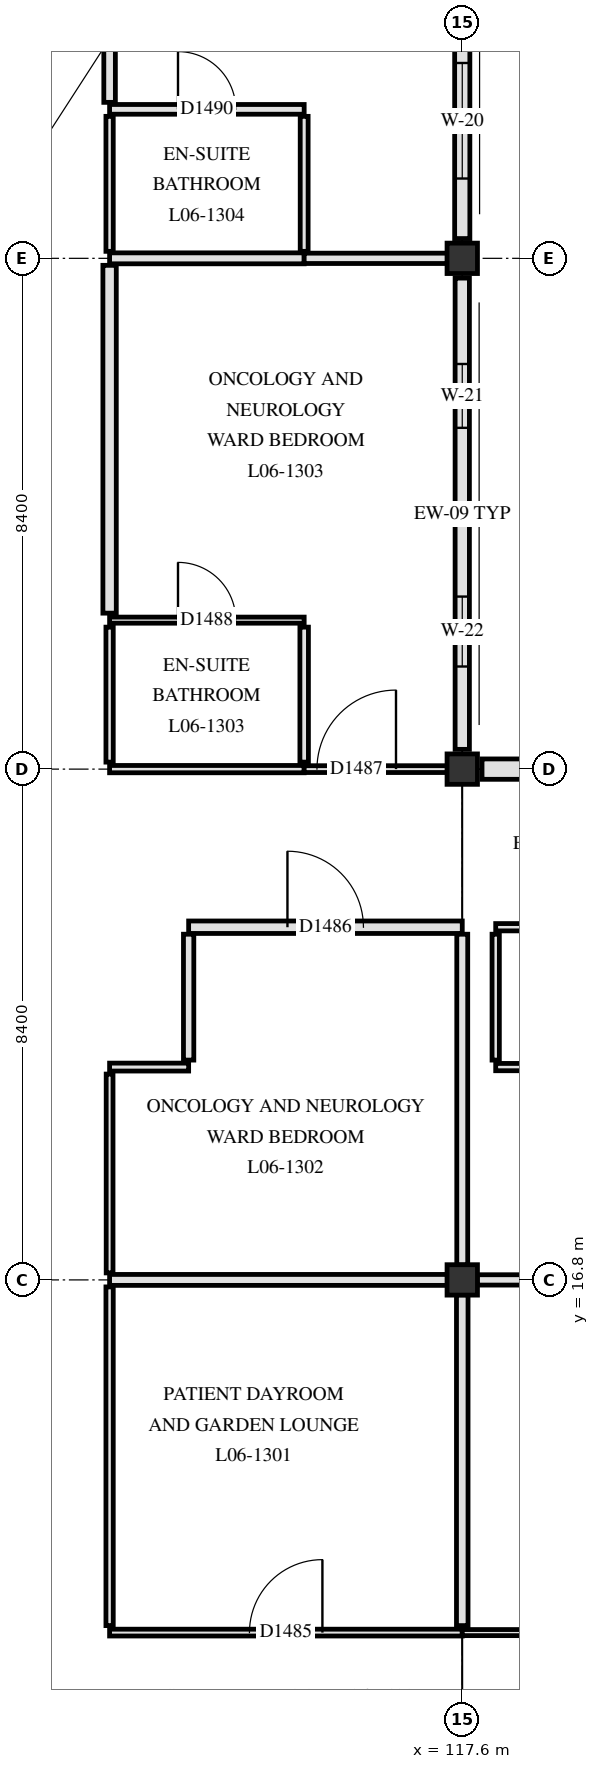
"""IFC4 building model, lengths in metres.
Left out: names, types, materials, properties, quantities, classifications, styles, units other than length and angle.
Written with IfcOpenShell. Run it as: python <this file> out.ifc"""

import sys

from ifc_helpers import new_model, si_unit, direction, frame, frame_2d, origin, origin_2d, place, context, subcontext, project, spatial, rectangle, extrude, element, fill, save


model = new_model("IFC4")
c1 = context("Model", 3, precision=1e-05, world=origin(), true_north=direction((0.0, 1.0)))
c2 = subcontext(c1, "Body", "Model", "MODEL_VIEW")
j1 = project(units=[si_unit("LENGTHUNIT", "METRE"), si_unit("PLANEANGLEUNIT", "RADIAN")], contexts=[c1])
p1 = place(None, origin())
s1 = spatial("IfcSite", under=j1, at=p1, CompositionType="ELEMENT")
p2 = place(p1, origin())
s2 = spatial("IfcBuilding", under=s1, at=p2, CompositionType="ELEMENT")
p3 = place(p2, frame((0.0, 0.0, 26.4)))
s3 = spatial("IfcBuildingStorey", under=s2, at=p3, CompositionType="ELEMENT", Elevation=26.4)
for number, where, z_axis, x_axis in (
    (1, (117.6, 16.8, 0.0), (0.0, 0.0, 1.0), (1.0, 0.0, 0.0)),
    (2, (117.6, 25.2, 0.0), (0.0, 0.0, 1.0), (1.0, 0.0, 0.0)),
    (3, (117.6, 33.6, 0.0), (0.0, 0.0, 1.0), (1.0, 0.0, 0.0)),
):
    element("IfcColumn", number, at=place(p3, frame(where, z_axis=z_axis, x_axis=x_axis)), inside=s3, PredefinedType="COLUMN", context=c2, shape_type="SweptSolid", body=[
        extrude(rectangle(XDim=0.5, YDim=0.5, at=origin_2d()), origin(), (0.0, 0.0, 1.0), 3.9),
    ])
p4 = place(p3, frame((117.6, 41.675, 0.0), z_axis=(0.0, 0.0, 1.0), x_axis=(0.0, -1.0, 0.0)))
e4 = element("IfcWall", 4, at=p4, inside=s3, PredefinedType="SOLIDWALL", context=c2, shape_type="SweptSolid", body=[
    extrude(rectangle(XDim=7.75, YDim=0.25, at=frame_2d((3.875, 0.0))), origin(), (0.0, 0.0, 1.0), 3.38),
])
p5 = place(p4, frame((1.038, 0.0, 0.85)))
e5 = element("IfcOpeningElement", 5, at=p5, cuts=e4, PredefinedType="OPENING", context=c2, shape_type="SweptSolid", body=[
    extrude(rectangle(XDim=1.8, YDim=1.42, at=frame_2d((0.9, 0.71))), frame((0.0, 0.135, 0.0), z_axis=(0.0, -1.0, 0.0), x_axis=(1.0, 0.0, 0.0)), (0.0, 0.0, 1.0), 0.27),
])
p6 = place(p4, frame((4.863, 0.0, 0.85)))
e6 = element("IfcOpeningElement", 6, at=p6, cuts=e4, PredefinedType="OPENING", context=c2, shape_type="SweptSolid", body=[
    extrude(rectangle(XDim=1.9, YDim=1.42, at=frame_2d((0.95, 0.71))), frame((0.0, 0.135, 0.0), z_axis=(0.0, -1.0, 0.0), x_axis=(1.0, 0.0, 0.0)), (0.0, 0.0, 1.0), 0.27),
])
p7 = place(p3, frame((117.6, 33.275, 0.0), z_axis=(0.0, 0.0, 1.0), x_axis=(0.0, -1.0, 0.0)))
e7 = element("IfcWall", 7, at=p7, inside=s3, PredefinedType="SOLIDWALL", context=c2, shape_type="SweptSolid", body=[
    extrude(rectangle(XDim=7.75, YDim=0.235, at=frame_2d((3.875, 0.0))), origin(), (0.0, 0.0, 1.0), 3.38),
])
p8 = place(p7, frame((1.413, 0.0, 0.85)))
e8 = element("IfcOpeningElement", 8, at=p8, cuts=e7, PredefinedType="OPENING", context=c2, shape_type="SweptSolid", body=[
    extrude(rectangle(XDim=1.05, YDim=1.54, at=frame_2d((0.525, 0.77))), frame((0.0, 0.127, 0.0), z_axis=(0.0, -1.0, 0.0), x_axis=(1.0, 0.0, 0.0)), (0.0, 0.0, 1.0), 0.255),
])
p9 = place(p7, frame((5.238, 0.0, 0.85)))
e9 = element("IfcOpeningElement", 9, at=p9, cuts=e7, PredefinedType="OPENING", context=c2, shape_type="SweptSolid", body=[
    extrude(rectangle(XDim=1.15, YDim=1.54, at=frame_2d((0.575, 0.77))), frame((0.0, 0.127, 0.0), z_axis=(0.0, -1.0, 0.0), x_axis=(1.0, 0.0, 0.0)), (0.0, 0.0, 1.0), 0.255),
])
p10 = place(p3, frame((117.925, 25.2, 0.0), z_axis=(0.0, 0.0, 1.0), x_axis=(1.0, 0.0, 0.0)))
e10 = element("IfcWall", 10, at=p10, inside=s3, PredefinedType="SOLIDWALL", context=c2, shape_type="SweptSolid", body=[
    extrude(rectangle(XDim=7.75, YDim=0.335, at=frame_2d((3.875, 0.0))), origin(), (0.0, 0.0, 1.0), 3.36),
])
p11 = place(p10, frame((1.312, 0.0, 0.85)))
e11 = element("IfcOpeningElement", 11, at=p11, cuts=e10, PredefinedType="OPENING", context=c2, shape_type="SweptSolid", body=[
    extrude(rectangle(XDim=1.25, YDim=1.54, at=frame_2d((0.625, 0.77))), frame((0.0, 0.177, 0.0), z_axis=(0.0, -1.0, 0.0), x_axis=(1.0, 0.0, 0.0)), (0.0, 0.0, 1.0), 0.355),
])
p12 = place(p10, frame((5.137, 0.0, 0.85)))
e12 = element("IfcOpeningElement", 12, at=p12, cuts=e10, PredefinedType="OPENING", context=c2, shape_type="SweptSolid", body=[
    extrude(rectangle(XDim=1.35, YDim=1.54, at=frame_2d((0.675, 0.77))), frame((0.0, 0.177, 0.0), z_axis=(0.0, -1.0, 0.0), x_axis=(1.0, 0.0, 0.0)), (0.0, 0.0, 1.0), 0.355),
])
p13 = place(p3, frame((111.8, 11.0, 0.0), z_axis=(0.0, 0.0, 1.0), x_axis=(1.0, 0.0, 0.0)))
e13 = element("IfcWall", 13, at=p13, inside=s3, PredefinedType="PARTITIONING", context=c2, shape_type="SweptSolid", body=[
    extrude(rectangle(XDim=5.8, YDim=0.112, at=frame_2d((2.9, 0.0))), origin(), (0.0, 0.0, 1.0), 3.21),
])
p14 = place(p13, frame((2.3, 0.0, 0.0)))
e14 = element("IfcOpeningElement", 14, at=p14, cuts=e13, PredefinedType="OPENING", context=c2, shape_type="SweptSolid", body=[
    extrude(rectangle(XDim=1.2, YDim=2.15, at=frame_2d((0.6, 1.075))), frame((0.0, 0.066, 0.0), z_axis=(0.0, -1.0, 0.0), x_axis=(1.0, 0.0, 0.0)), (0.0, 0.0, 1.0), 0.132),
])
p15 = place(p3, frame((117.6, 11.0, 0.0), z_axis=(0.0, 0.0, 1.0), x_axis=(1.0, 0.0, 0.0)))
e15 = element("IfcWall", 15, at=p15, inside=s3, PredefinedType="PARTITIONING", context=c2, shape_type="SweptSolid", body=[
    extrude(rectangle(XDim=8.4, YDim=0.1, at=frame_2d((4.2, 0.0))), origin(), (0.0, 0.0, 1.0), 3.21),
])
p16 = place(p15, frame((3.525, 0.0, 0.0)))
e16 = element("IfcOpeningElement", 16, at=p16, cuts=e15, PredefinedType="OPENING", context=c2, shape_type="SweptSolid", body=[
    extrude(rectangle(XDim=1.35, YDim=2.2, at=frame_2d((0.675, 1.1))), frame((0.0, 0.06, 0.0), z_axis=(0.0, -1.0, 0.0), x_axis=(1.0, 0.0, 0.0)), (0.0, 0.0, 1.0), 0.12),
])
p17 = place(p3, frame((111.8, 16.8, 0.0), z_axis=(0.0, 0.0, 1.0), x_axis=(1.0, 0.0, 0.0)))
e17 = element("IfcWall", 17, at=p17, inside=s3, PredefinedType="PARTITIONING", context=c2, shape_type="SweptSolid", body=[
    extrude(rectangle(XDim=5.555, YDim=0.18, at=frame_2d((2.777, 0.0))), origin(), (0.0, 0.0, 1.0), 3.21),
])
p18 = place(p3, frame((117.845, 16.8, 0.0), z_axis=(0.0, 0.0, 1.0), x_axis=(1.0, 0.0, 0.0)))
e18 = element("IfcWall", 18, at=p18, inside=s3, PredefinedType="PARTITIONING", context=c2, shape_type="SweptSolid", body=[
    extrude(rectangle(XDim=7.91, YDim=0.17, at=frame_2d((3.955, 0.0))), origin(), (0.0, 0.0, 1.0), 3.21),
])
p19 = place(p3, frame((111.8, 20.3, 0.0), z_axis=(0.0, 0.0, 1.0), x_axis=(1.0, 0.0, 0.0)))
e19 = element("IfcWall", 19, at=p19, inside=s3, PredefinedType="PARTITIONING", context=c2, shape_type="SweptSolid", body=[
    extrude(rectangle(XDim=1.3, YDim=0.13, at=frame_2d((0.65, 0.0))), origin(), (0.0, 0.0, 1.0), 3.61),
])
p20 = place(p3, frame((118.15, 20.3, 0.0), z_axis=(0.0, 0.0, 1.0), x_axis=(1.0, 0.0, 0.0)))
e20 = element("IfcWall", 20, at=p20, inside=s3, PredefinedType="PARTITIONING", context=c2, shape_type="SweptSolid", body=[
    extrude(rectangle(XDim=3.35, YDim=0.12, at=frame_2d((1.675, 0.0))), origin(), (0.0, 0.0, 1.0), 3.61),
])
p21 = place(p20, frame((1.2, 0.0, 0.0)))
e21 = element("IfcOpeningElement", 21, at=p21, cuts=e20, PredefinedType="OPENING", context=c2, shape_type="SweptSolid", body=[
    extrude(rectangle(XDim=0.95, YDim=2.1, at=frame_2d((0.475, 1.05))), frame((0.0, 0.07, 0.0), z_axis=(0.0, -1.0, 0.0), x_axis=(1.0, 0.0, 0.0)), (0.0, 0.0, 1.0), 0.14),
])
p22 = place(p3, frame((113.1, 22.6, 0.0), z_axis=(0.0, 0.0, 1.0), x_axis=(1.0, 0.0, 0.0)))
e22 = element("IfcWall", 22, at=p22, inside=s3, PredefinedType="PARTITIONING", context=c2, shape_type="SweptSolid", body=[
    extrude(rectangle(XDim=4.5, YDim=0.205, at=frame_2d((2.25, 0.0))), origin(), (0.0, 0.0, 1.0), 3.21),
])
p23 = place(p22, frame((1.625, 0.0, 0.0)))
e23 = element("IfcOpeningElement", 23, at=p23, cuts=e22, PredefinedType="OPENING", context=c2, shape_type="SweptSolid", body=[
    extrude(rectangle(XDim=1.25, YDim=2.2, at=frame_2d((0.625, 1.1))), frame((0.0, 0.113, 0.0), z_axis=(0.0, -1.0, 0.0), x_axis=(1.0, 0.0, 0.0)), (0.0, 0.0, 1.0), 0.225),
])
p24 = place(p3, frame((118.15, 22.6, 0.0), z_axis=(0.0, 0.0, 1.0), x_axis=(1.0, 0.0, 0.0)))
e24 = element("IfcWall", 24, at=p24, inside=s3, PredefinedType="PARTITIONING", context=c2, shape_type="SweptSolid", body=[
    extrude(rectangle(XDim=3.35, YDim=0.12, at=frame_2d((1.675, 0.0))), origin(), (0.0, 0.0, 1.0), 3.61),
])
p25 = place(p3, frame((111.8, 25.2, 0.0), z_axis=(0.0, 0.0, 1.0), x_axis=(1.0, 0.0, 0.0)))
e25 = element("IfcWall", 25, at=p25, inside=s3, PredefinedType="PARTITIONING", context=c2, shape_type="SweptSolid", body=[
    extrude(rectangle(XDim=3.2, YDim=0.12, at=frame_2d((1.6, 0.0))), origin(), (0.0, 0.0, 1.0), 3.21),
])
p26 = place(p3, frame((115.0, 25.2, 0.0), z_axis=(0.0, 0.0, 1.0), x_axis=(1.0, 0.0, 0.0)))
e26 = element("IfcWall", 26, at=p26, inside=s3, PredefinedType="PARTITIONING", context=c2, shape_type="SweptSolid", body=[
    extrude(rectangle(XDim=2.355, YDim=0.112, at=frame_2d((1.177, 0.0))), origin(), (0.0, 0.0, 1.0), 3.21),
])
p27 = place(p26, frame((0.21, 0.0, 0.0)))
e27 = element("IfcOpeningElement", 27, at=p27, cuts=e26, PredefinedType="OPENING", context=c2, shape_type="SweptSolid", body=[
    extrude(rectangle(XDim=1.3, YDim=2.2, at=frame_2d((0.65, 1.1))), frame((0.0, 0.066, 0.0), z_axis=(0.0, -1.0, 0.0), x_axis=(1.0, 0.0, 0.0)), (0.0, 0.0, 1.0), 0.132),
])
p28 = place(p3, frame((111.8, 27.65, 0.0), z_axis=(0.0, 0.0, 1.0), x_axis=(1.0, 0.0, 0.0)))
e28 = element("IfcWall", 28, at=p28, inside=s3, PredefinedType="PARTITIONING", context=c2, shape_type="SweptSolid", body=[
    extrude(rectangle(XDim=3.2, YDim=0.1, at=frame_2d((1.6, 0.0))), origin(), (0.0, 0.0, 1.0), 3.61),
])
p29 = place(p28, frame((1.125, 0.0, 0.0)))
e29 = element("IfcOpeningElement", 29, at=p29, cuts=e28, PredefinedType="OPENING", context=c2, shape_type="SweptSolid", body=[
    extrude(rectangle(XDim=0.95, YDim=2.1, at=frame_2d((0.475, 1.05))), frame((0.0, 0.06, 0.0), z_axis=(0.0, -1.0, 0.0), x_axis=(1.0, 0.0, 0.0)), (0.0, 0.0, 1.0), 0.12),
])
p30 = place(p3, frame((111.8, 33.6, 0.0), z_axis=(0.0, 0.0, 1.0), x_axis=(1.0, 0.0, 0.0)))
e30 = element("IfcWall", 30, at=p30, inside=s3, PredefinedType="PARTITIONING", context=c2, shape_type="SweptSolid", body=[
    extrude(rectangle(XDim=3.2, YDim=0.18, at=frame_2d((1.6, 0.0))), origin(), (0.0, 0.0, 1.0), 3.21),
])
p31 = place(p3, frame((115.0, 33.6, 0.0), z_axis=(0.0, 0.0, 1.0), x_axis=(1.0, 0.0, 0.0)))
e31 = element("IfcWall", 31, at=p31, inside=s3, PredefinedType="PARTITIONING", context=c2, shape_type="SweptSolid", body=[
    extrude(rectangle(XDim=2.355, YDim=0.17, at=frame_2d((1.177, 0.0))), origin(), (0.0, 0.0, 1.0), 3.21),
])
p32 = place(p3, frame((111.8, 36.05, 0.0), z_axis=(0.0, 0.0, 1.0), x_axis=(1.0, 0.0, 0.0)))
e32 = element("IfcWall", 32, at=p32, inside=s3, PredefinedType="PARTITIONING", context=c2, shape_type="SweptSolid", body=[
    extrude(rectangle(XDim=3.2, YDim=0.16, at=frame_2d((1.6, 0.0))), origin(), (0.0, 0.0, 1.0), 3.61),
])
p33 = place(p32, frame((1.125, 0.0, 0.0)))
e33 = element("IfcOpeningElement", 33, at=p33, cuts=e32, PredefinedType="OPENING", context=c2, shape_type="SweptSolid", body=[
    extrude(rectangle(XDim=0.95, YDim=2.1, at=frame_2d((0.475, 1.05))), frame((0.0, 0.09, 0.0), z_axis=(0.0, -1.0, 0.0), x_axis=(1.0, 0.0, 0.0)), (0.0, 0.0, 1.0), 0.18),
])
p34 = place(p3, frame((111.8, 11.115, 0.0), z_axis=(0.0, 0.0, 1.0), x_axis=(0.0, 1.0, 0.0)))
e34 = element("IfcWall", 34, at=p34, inside=s3, PredefinedType="PARTITIONING", context=c2, shape_type="SweptSolid", body=[
    extrude(rectangle(XDim=5.57, YDim=0.12, at=frame_2d((2.785, 0.0))), origin(), (0.0, 0.0, 1.0), 3.34),
])
p35 = place(p3, frame((111.8, 16.915, 0.0), z_axis=(0.0, 0.0, 1.0), x_axis=(0.0, 1.0, 0.0)))
e35 = element("IfcWall", 35, at=p35, inside=s3, PredefinedType="PARTITIONING", context=c2, shape_type="SweptSolid", body=[
    extrude(rectangle(XDim=3.27, YDim=0.112, at=frame_2d((1.635, 0.0))), origin(), (0.0, 0.0, 1.0), 3.34),
])
p36 = place(p3, frame((111.8, 25.315, 0.0), z_axis=(0.0, 0.0, 1.0), x_axis=(0.0, 1.0, 0.0)))
e36 = element("IfcWall", 36, at=p36, inside=s3, PredefinedType="PARTITIONING", context=c2, shape_type="SweptSolid", body=[
    extrude(rectangle(XDim=2.22, YDim=0.12, at=frame_2d((1.11, 0.0))), origin(), (0.0, 0.0, 1.0), 3.61),
])
p37 = place(p3, frame((111.8, 27.765, 0.0), z_axis=(0.0, 0.0, 1.0), x_axis=(0.0, 1.0, 0.0)))
e37 = element("IfcWall", 37, at=p37, inside=s3, PredefinedType="PARTITIONING", context=c2, shape_type="SweptSolid", body=[
    extrude(rectangle(XDim=5.72, YDim=0.22, at=frame_2d((2.86, 0.0))), origin(), (0.0, 0.0, 1.0), 3.34),
])
p38 = place(p3, frame((111.8, 33.715, 0.0), z_axis=(0.0, 0.0, 1.0), x_axis=(0.0, 1.0, 0.0)))
e38 = element("IfcWall", 38, at=p38, inside=s3, PredefinedType="PARTITIONING", context=c2, shape_type="SweptSolid", body=[
    extrude(rectangle(XDim=2.22, YDim=0.12, at=frame_2d((1.11, 0.0))), origin(), (0.0, 0.0, 1.0), 3.61),
])
p39 = place(p3, frame((111.8, 36.165, 0.0), z_axis=(0.0, 0.0, 1.0), x_axis=(0.0, 1.0, 0.0)))
e39 = element("IfcWall", 39, at=p39, inside=s3, PredefinedType="PARTITIONING", context=c2, shape_type="SweptSolid", body=[
    extrude(rectangle(XDim=5.72, YDim=0.19, at=frame_2d((2.86, 0.0))), origin(), (0.0, 0.0, 1.0), 3.34),
])
p40 = place(p3, frame((113.1, 20.415, 0.0), z_axis=(0.0, 0.0, 1.0), x_axis=(0.0, 1.0, 0.0)))
e40 = element("IfcWall", 40, at=p40, inside=s3, PredefinedType="PARTITIONING", context=c2, shape_type="SweptSolid", body=[
    extrude(rectangle(XDim=2.07, YDim=0.17, at=frame_2d((1.035, 0.0))), origin(), (0.0, 0.0, 1.0), 3.34),
])
p41 = place(p3, frame((115.0, 25.315, 0.0), z_axis=(0.0, 0.0, 1.0), x_axis=(0.0, 1.0, 0.0)))
e41 = element("IfcWall", 41, at=p41, inside=s3, PredefinedType="PARTITIONING", context=c2, shape_type="SweptSolid", body=[
    extrude(rectangle(XDim=2.22, YDim=0.14, at=frame_2d((1.11, 0.0))), origin(), (0.0, 0.0, 1.0), 3.61),
])
p42 = place(p3, frame((115.0, 33.715, 0.0), z_axis=(0.0, 0.0, 1.0), x_axis=(0.0, 1.0, 0.0)))
e42 = element("IfcWall", 42, at=p42, inside=s3, PredefinedType="PARTITIONING", context=c2, shape_type="SweptSolid", body=[
    extrude(rectangle(XDim=2.22, YDim=0.13, at=frame_2d((1.11, 0.0))), origin(), (0.0, 0.0, 1.0), 3.61),
])
p43 = place(p3, frame((117.6, 11.115, 0.0), z_axis=(0.0, 0.0, 1.0), x_axis=(0.0, 1.0, 0.0)))
e43 = element("IfcWall", 43, at=p43, inside=s3, PredefinedType="PARTITIONING", context=c2, shape_type="SweptSolid", body=[
    extrude(rectangle(XDim=5.44, YDim=0.19, at=frame_2d((2.72, 0.0))), origin(), (0.0, 0.0, 1.0), 3.21),
])
p44 = place(p3, frame((117.6, 17.045, 0.0), z_axis=(0.0, 0.0, 1.0), x_axis=(0.0, 1.0, 0.0)))
e44 = element("IfcWall", 44, at=p44, inside=s3, PredefinedType="PARTITIONING", context=c2, shape_type="SweptSolid", body=[
    extrude(rectangle(XDim=5.44, YDim=0.18, at=frame_2d((2.72, 0.0))), origin(), (0.0, 0.0, 1.0), 3.21),
])
p45 = place(p3, frame((118.15, 20.415, 0.0), z_axis=(0.0, 0.0, 1.0), x_axis=(0.0, 1.0, 0.0)))
e45 = element("IfcWall", 45, at=p45, inside=s3, PredefinedType="PARTITIONING", context=c2, shape_type="SweptSolid", body=[
    extrude(rectangle(XDim=2.07, YDim=0.12, at=frame_2d((1.035, 0.0))), origin(), (0.0, 0.0, 1.0), 3.34),
])
p46 = place(p6, origin())
e46 = element("IfcWindow", 46, at=p46, inside=s3, PartitioningType="SINGLE_PANEL", PredefinedType="WINDOW", context=c2, shape_type="SweptSolid", body=[
    extrude(rectangle(XDim=1.9, YDim=1.42, at=frame_2d((0.95, 0.71))), frame((0.0, 0.03, 0.0), z_axis=(0.0, -1.0, 0.0), x_axis=(1.0, 0.0, 0.0)), (0.0, 0.0, 1.0), 0.06),
])
fill(e6, e46)
p47 = place(p8, origin())
e47 = element("IfcWindow", 47, at=p47, inside=s3, PartitioningType="SINGLE_PANEL", PredefinedType="WINDOW", context=c2, shape_type="SweptSolid", body=[
    extrude(rectangle(XDim=1.05, YDim=1.54, at=frame_2d((0.525, 0.77))), frame((0.0, 0.03, 0.0), z_axis=(0.0, -1.0, 0.0), x_axis=(1.0, 0.0, 0.0)), (0.0, 0.0, 1.0), 0.06),
])
fill(e8, e47)
p48 = place(p9, origin())
e48 = element("IfcWindow", 48, at=p48, inside=s3, PartitioningType="SINGLE_PANEL", PredefinedType="WINDOW", context=c2, shape_type="SweptSolid", body=[
    extrude(rectangle(XDim=1.15, YDim=1.54, at=frame_2d((0.575, 0.77))), frame((0.0, 0.03, 0.0), z_axis=(0.0, -1.0, 0.0), x_axis=(1.0, 0.0, 0.0)), (0.0, 0.0, 1.0), 0.06),
])
fill(e9, e48)
p49 = place(p14, origin())
e49 = element("IfcDoor", 49, at=p49, inside=s3, OperationType="SINGLE_SWING_RIGHT", PredefinedType="DOOR", context=c2, shape_type="SweptSolid", body=[
    extrude(rectangle(XDim=1.2, YDim=2.15, at=frame_2d((0.6, 1.075))), frame((0.0, 0.025, 0.0), z_axis=(0.0, -1.0, 0.0), x_axis=(1.0, 0.0, 0.0)), (0.0, 0.0, 1.0), 0.05),
])
fill(e14, e49)
p50 = place(p23, origin())
e50 = element("IfcDoor", 50, at=p50, inside=s3, OperationType="SINGLE_SWING_LEFT", PredefinedType="DOOR", context=c2, shape_type="SweptSolid", body=[
    extrude(rectangle(XDim=1.25, YDim=2.2, at=frame_2d((0.625, 1.1))), frame((0.0, 0.025, 0.0), z_axis=(0.0, -1.0, 0.0), x_axis=(1.0, 0.0, 0.0)), (0.0, 0.0, 1.0), 0.05),
])
fill(e23, e50)
p51 = place(p27, origin())
e51 = element("IfcDoor", 51, at=p51, inside=s3, OperationType="SINGLE_SWING_RIGHT", PredefinedType="DOOR", context=c2, shape_type="SweptSolid", body=[
    extrude(rectangle(XDim=1.3, YDim=2.2, at=frame_2d((0.65, 1.1))), frame((0.0, 0.025, 0.0), z_axis=(0.0, -1.0, 0.0), x_axis=(1.0, 0.0, 0.0)), (0.0, 0.0, 1.0), 0.05),
])
fill(e27, e51)
p52 = place(p29, origin())
e52 = element("IfcDoor", 52, at=p52, inside=s3, OperationType="SINGLE_SWING_LEFT", PredefinedType="DOOR", context=c2, shape_type="SweptSolid", body=[
    extrude(rectangle(XDim=0.95, YDim=2.1, at=frame_2d((0.475, 1.05))), frame((0.0, 0.025, 0.0), z_axis=(0.0, -1.0, 0.0), x_axis=(1.0, 0.0, 0.0)), (0.0, 0.0, 1.0), 0.05),
])
fill(e29, e52)
p53 = place(p33, origin())
e53 = element("IfcDoor", 53, at=p53, inside=s3, OperationType="SINGLE_SWING_LEFT", PredefinedType="DOOR", context=c2, shape_type="SweptSolid", body=[
    extrude(rectangle(XDim=0.95, YDim=2.1, at=frame_2d((0.475, 1.05))), frame((0.0, 0.025, 0.0), z_axis=(0.0, -1.0, 0.0), x_axis=(1.0, 0.0, 0.0)), (0.0, 0.0, 1.0), 0.05),
])
fill(e33, e53)
save(model, sys.argv[1])
